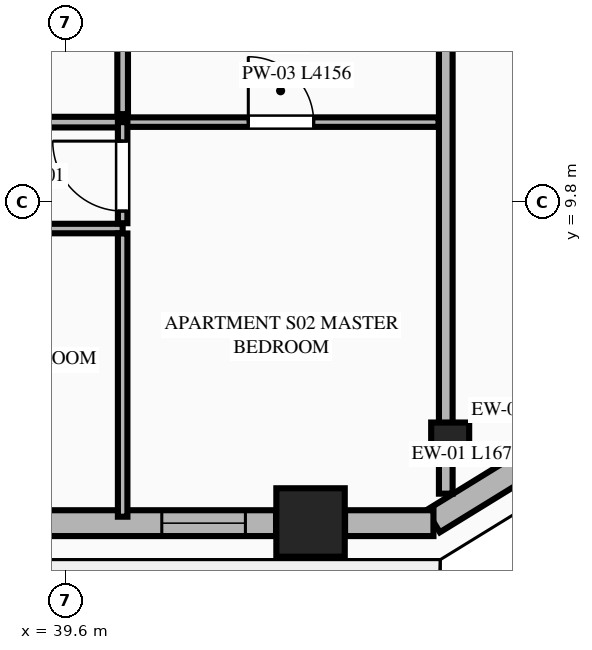
"""IFC4 building model, lengths in metres.
Left out: names, types, materials, properties, quantities, classifications, styles, units other than length and angle.
Written with IfcOpenShell. Run it as: python <this file> out.ifc"""

import sys

from ifc_helpers import new_model, si_unit, direction, frame, frame_2d, origin, origin_2d, place, context, subcontext, project, spatial, rectangle, extrude, element, fill, save


model = new_model("IFC4")
c1 = context("Model", 3, precision=1e-05, world=origin(), true_north=direction((0.0, 1.0)))
c2 = subcontext(c1, "Body", "Model", "MODEL_VIEW")
j1 = project(units=[si_unit("LENGTHUNIT", "METRE"), si_unit("PLANEANGLEUNIT", "RADIAN")], contexts=[c1])
p1 = place(None, origin())
s1 = spatial("IfcSite", under=j1, at=p1, CompositionType="ELEMENT")
p2 = place(p1, origin())
s2 = spatial("IfcBuilding", under=s1, at=p2, CompositionType="ELEMENT")
p3 = place(p2, frame((0.0, 0.0, 182.55)))
s3 = spatial("IfcBuildingStorey", under=s2, at=p3, CompositionType="ELEMENT", Elevation=182.55)
p4 = place(p3, frame((42.821, 5.589, 0.0), z_axis=(0.0, 0.0, 1.0), x_axis=(1.0, 0.0, 0.0)))
e1 = element("IfcColumn", 1, at=p4, inside=s3, PredefinedType="COLUMN", context=c2, shape_type="SweptSolid", body=[
    extrude(rectangle(XDim=0.9, YDim=0.9, at=origin_2d()), origin(), (0.0, 0.0, 1.0), 3.55),
])
p5 = place(p3, frame((44.658, 6.654, 0.0), z_axis=(0.0, 0.0, 1.0), x_axis=(0.865230187018, 0.501374833306, 0.0)))
e2 = element("IfcColumn", 2, at=p5, inside=s3, PredefinedType="PILASTER", context=c2, shape_type="SweptSolid", body=[
    extrude(rectangle(XDim=0.5, YDim=0.35, at=origin_2d()), origin(), (0.0, 0.0, 1.0), 3.55),
])
p6 = place(p3, frame((44.433, 5.605, 0.0), z_axis=(0.0, 0.0, 1.0), x_axis=(0.851778214877, 0.523902541185, 0.0)))
e3 = element("IfcWall", 3, at=p6, inside=s3, PredefinedType="STANDARD", context=c2, shape_type="SweptSolid", body=[
    extrude(rectangle(XDim=1.678, YDim=0.34, at=frame_2d((0.839, 0.0))), origin(), (0.0, 0.0, 1.0), 3.35),
])
p7 = place(p3, frame((36.397, 5.58, 0.0), z_axis=(0.0, 0.0, 1.0), x_axis=(1.0, 0.0, 0.0)))
e4 = element("IfcWall", 4, at=p7, inside=s3, PredefinedType="STANDARD", context=c2, shape_type="SweptSolid", body=[
    extrude(rectangle(XDim=5.97, YDim=0.34, at=frame_2d((2.985, 0.0))), origin(), (0.0, 0.0, 1.0), 2.883),
])
p8 = place(p7, frame((1.37, 0.0, 0.75)))
e5 = element("IfcOpeningElement", 5, at=p8, cuts=e4, PredefinedType="OPENING", context=c2, shape_type="SweptSolid", body=[
    extrude(rectangle(XDim=1.1, YDim=1.983, at=frame_2d((0.55, 0.991))), frame((0.0, 0.18, 0.0), z_axis=(0.0, -1.0, 0.0), x_axis=(1.0, 0.0, 0.0)), (0.0, 0.0, 1.0), 0.36),
])
p9 = place(p7, frame((4.467, 0.0, 0.75)))
e6 = element("IfcOpeningElement", 6, at=p9, cuts=e4, PredefinedType="OPENING", context=c2, shape_type="SweptSolid", body=[
    extrude(rectangle(XDim=1.1, YDim=1.983, at=frame_2d((0.55, 0.991))), frame((0.0, 0.18, 0.0), z_axis=(0.0, -1.0, 0.0), x_axis=(1.0, 0.0, 0.0)), (0.0, 0.0, 1.0), 0.36),
])
p10 = place(p3, frame((43.275, 5.58, 0.0), z_axis=(0.0, 0.0, 1.0), x_axis=(1.0, 0.0, 0.0)))
e7 = element("IfcWall", 7, at=p10, inside=s3, PredefinedType="STANDARD", context=c2, shape_type="SweptSolid", body=[
    extrude(rectangle(XDim=1.163, YDim=0.34, at=frame_2d((0.582, 0.0))), origin(), (0.0, 0.0, 1.0), 3.35),
])
p11 = place(p3, frame((44.6, 5.968, 0.0), z_axis=(0.0, 0.0, 1.0), x_axis=(0.0, 1.0, 0.0)))
e8 = element("IfcWall", 8, at=p11, inside=s3, PredefinedType="PARTITIONING", context=c2, shape_type="SweptSolid", body=[
    extrude(rectangle(XDim=10.282, YDim=0.18, at=frame_2d((5.141, 0.0))), origin(), (0.0, 0.0, 1.0), 3.35),
])
p12 = place(p3, frame((36.099, 10.856, 0.0), z_axis=(0.0, 0.0, 1.0), x_axis=(1.0, 0.0, 0.0)))
e9 = element("IfcWall", 9, at=p12, inside=s3, PredefinedType="PLUMBINGWALL", context=c2, shape_type="SweptSolid", body=[
    extrude(rectangle(XDim=4.25, YDim=0.14, at=frame_2d((2.125, 0.0))), origin(), (0.0, 0.0, 1.0), 3.35),
])
p13 = place(p12, frame((0.3, 0.0, 0.0)))
e10 = element("IfcOpeningElement", 10, at=p13, cuts=e9, PredefinedType="OPENING", context=c2, shape_type="SweptSolid", body=[
    extrude(rectangle(XDim=0.88, YDim=2.15, at=frame_2d((0.44, 1.075))), frame((0.0, 0.08, 0.0), z_axis=(0.0, -1.0, 0.0), x_axis=(1.0, 0.0, 0.0)), (0.0, 0.0, 1.0), 0.16),
])
p14 = place(p3, frame((40.349, 10.856, 0.0), z_axis=(0.0, 0.0, 1.0), x_axis=(1.0, 0.0, 0.0)))
e11 = element("IfcWall", 11, at=p14, inside=s3, PredefinedType="PARTITIONING", context=c2, shape_type="SweptSolid", body=[
    extrude(rectangle(XDim=4.156, YDim=0.125, at=frame_2d((2.078, 0.0))), origin(), (0.0, 0.0, 1.0), 3.35),
])
p15 = place(p14, frame((1.653, 0.0, 0.0)))
e12 = element("IfcOpeningElement", 12, at=p15, cuts=e11, PredefinedType="OPENING", context=c2, shape_type="SweptSolid", body=[
    extrude(rectangle(XDim=0.86, YDim=2.1, at=frame_2d((0.43, 1.05))), frame((0.0, 0.073, 0.0), z_axis=(0.0, -1.0, 0.0), x_axis=(1.0, 0.0, 0.0)), (0.0, 0.0, 1.0), 0.145),
])
p16 = place(p3, frame((36.099, 9.456, 0.0), z_axis=(0.0, 0.0, 1.0), x_axis=(1.0, 0.0, 0.0)))
e13 = element("IfcWall", 13, at=p16, inside=s3, PredefinedType="PARTITIONING", context=c2, shape_type="SweptSolid", body=[
    extrude(rectangle(XDim=4.25, YDim=0.125, at=frame_2d((2.125, 0.0))), origin(), (0.0, 0.0, 1.0), 3.35),
])
p17 = place(p16, frame((0.35, 0.0, 0.0)))
e14 = element("IfcOpeningElement", 14, at=p17, cuts=e13, PredefinedType="OPENING", context=c2, shape_type="SweptSolid", body=[
    extrude(rectangle(XDim=0.92, YDim=2.15, at=frame_2d((0.46, 1.075))), frame((0.0, 0.073, 0.0), z_axis=(0.0, -1.0, 0.0), x_axis=(1.0, 0.0, 0.0)), (0.0, 0.0, 1.0), 0.145),
])
p18 = place(p3, frame((40.349, 9.526, 0.0), z_axis=(0.0, 0.0, 1.0), x_axis=(0.0, 1.0, 0.0)))
e15 = element("IfcWall", 15, at=p18, inside=s3, PredefinedType="PARTITIONING", context=c2, shape_type="SweptSolid", body=[
    extrude(rectangle(XDim=1.33, YDim=0.125, at=frame_2d((0.665, 0.0))), origin(), (0.0, 0.0, 1.0), 3.35),
])
p19 = place(p18, frame((0.16, 0.0, 0.0)))
e16 = element("IfcOpeningElement", 16, at=p19, cuts=e15, PredefinedType="OPENING", context=c2, shape_type="SweptSolid", body=[
    extrude(rectangle(XDim=0.92, YDim=2.15, at=frame_2d((0.46, 1.075))), frame((0.0, 0.073, 0.0), z_axis=(0.0, -1.0, 0.0), x_axis=(1.0, 0.0, 0.0)), (0.0, 0.0, 1.0), 0.145),
])
p20 = place(p3, frame((40.349, 10.961, 0.0), z_axis=(0.0, 0.0, 1.0), x_axis=(0.0, 1.0, 0.0)))
e17 = element("IfcWall", 17, at=p20, inside=s3, PredefinedType="PLUMBINGWALL", context=c2, shape_type="SweptSolid", body=[
    extrude(rectangle(XDim=5.204, YDim=0.14, at=frame_2d((2.602, 0.0))), origin(), (0.0, 0.0, 1.0), 3.35),
])
p21 = place(p3, frame((40.349, 5.665, 0.0), z_axis=(0.0, 0.0, 1.0), x_axis=(0.0, 1.0, 0.0)))
e18 = element("IfcWall", 18, at=p21, inside=s3, PredefinedType="PARTITIONING", context=c2, shape_type="SweptSolid", body=[
    extrude(rectangle(XDim=3.726, YDim=0.125, at=frame_2d((1.863, 0.0))), origin(), (0.0, 0.0, 1.0), 3.35),
])
p22 = place(p15, origin())
e19 = element("IfcDoor", 19, at=p22, inside=s3, OperationType="SINGLE_SWING_LEFT", PredefinedType="DOOR", context=c2, shape_type="SweptSolid", body=[
    extrude(rectangle(XDim=0.86, YDim=2.1, at=frame_2d((0.43, 1.05))), frame((0.0, 0.025, 0.0), z_axis=(0.0, -1.0, 0.0), x_axis=(1.0, 0.0, 0.0)), (0.0, 0.0, 1.0), 0.05),
])
fill(e12, e19)
p23 = place(p19, origin())
e20 = element("IfcDoor", 20, at=p23, inside=s3, OperationType="SINGLE_SWING_RIGHT", PredefinedType="DOOR", context=c2, shape_type="SweptSolid", body=[
    extrude(rectangle(XDim=0.92, YDim=2.15, at=frame_2d((0.46, 1.075))), frame((0.0, 0.025, 0.0), z_axis=(0.0, -1.0, 0.0), x_axis=(1.0, 0.0, 0.0)), (0.0, 0.0, 1.0), 0.05),
])
fill(e16, e20)
p24 = place(p9, origin())
e21 = element("IfcWindow", 21, at=p24, inside=s3, PartitioningType="SINGLE_PANEL", PredefinedType="WINDOW", context=c2, shape_type="SweptSolid", body=[
    extrude(rectangle(XDim=1.1, YDim=1.983, at=frame_2d((0.55, 0.991))), frame((0.0, 0.03, 0.0), z_axis=(0.0, -1.0, 0.0), x_axis=(1.0, 0.0, 0.0)), (0.0, 0.0, 1.0), 0.06),
])
fill(e6, e21)
save(model, sys.argv[1])
